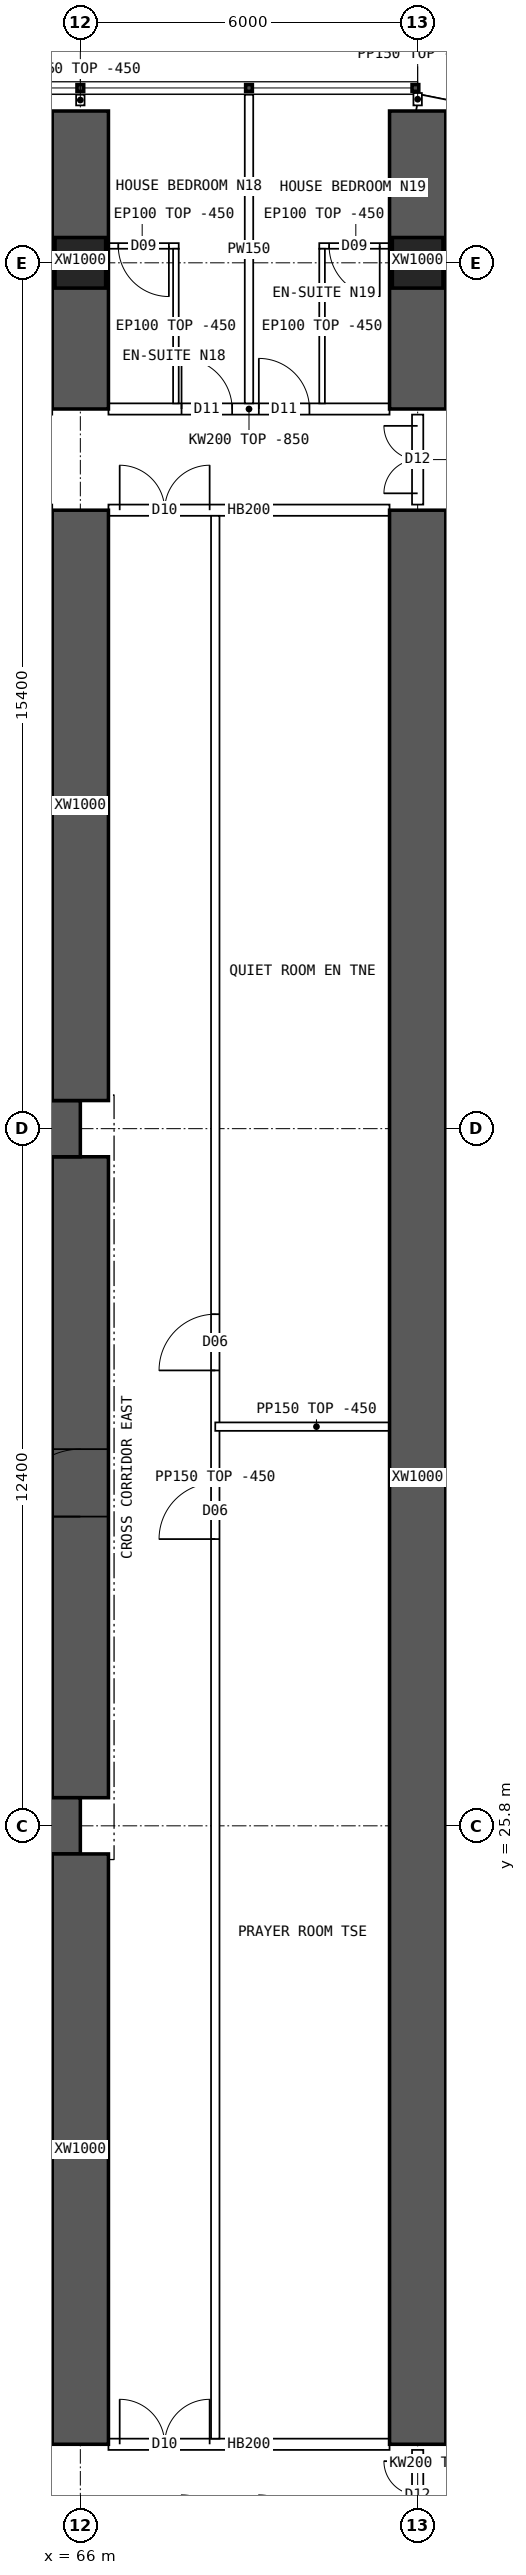
"""IFC4 building model, lengths in metres.
Left out: names, types, materials, properties, quantities, classifications, styles, units other than length and angle.
Written with IfcOpenShell. Run it as: python <this file> out.ifc"""

import sys

from ifc_helpers import new_model, si_unit, direction, frame, frame_2d, origin, origin_2d, place, context, subcontext, project, spatial, polyline, rectangle, hollow_rectangle, outline, extrude, element, fill, save


model = new_model("IFC4")
c1 = context("Model", 3, precision=1e-05, world=origin(), true_north=direction((0.0, 1.0)))
c2 = subcontext(c1, "Body", "Model", "MODEL_VIEW")
j1 = project(units=[si_unit("LENGTHUNIT", "METRE"), si_unit("PLANEANGLEUNIT", "RADIAN")], contexts=[c1])
p1 = place(None, origin())
s1 = spatial("IfcSite", under=j1, at=p1, CompositionType="ELEMENT")
p2 = place(p1, origin())
s2 = spatial("IfcBuilding", under=s1, at=p2, CompositionType="ELEMENT")
p3 = place(p2, frame((0.0, 0.0, 50.2)))
s3 = spatial("IfcBuildingStorey", under=s2, at=p3, CompositionType="ELEMENT", Elevation=50.2)
for number, where, z_axis, x_axis in (
    (1, (66.0, 53.6, 0.0), (0.0, 0.0, 1.0), (1.0, 0.0, 0.0)),
    (2, (72.0, 53.6, 0.0), (0.0, 0.0, 1.0), (1.0, 0.0, 0.0)),
):
    element("IfcColumn", number, at=place(p3, frame(where, z_axis=z_axis, x_axis=x_axis)), inside=s3, PredefinedType="COLUMN", context=c2, shape_type="SweptSolid", body=[
        extrude(hollow_rectangle(XDim=0.9, YDim=0.9, WallThickness=0.09, at=origin_2d()), origin(), (0.0, 0.0, 1.0), 3.75),
    ])
for number, where, z_axis, x_axis in (
    (3, (18.0, 25.8, 0.0), (0.0, 0.0, 1.0), (1.0, 0.0, 0.0)),
    (4, (18.0, 38.2, 0.0), (0.0, 0.0, 1.0), (1.0, 0.0, 0.0)),
):
    element("IfcWall", number, at=place(p3, frame(where, z_axis=z_axis, x_axis=x_axis)), inside=s3, PredefinedType="SHEAR", context=c2, shape_type="SweptSolid", body=[
        extrude(rectangle(XDim=48.0, YDim=1.0, at=frame_2d((24.0, 0.0))), origin(), (0.0, 0.0, 1.0), 3.75),
    ])
p4 = place(p3, frame((66.0, 26.3, 0.0), z_axis=(0.0, 0.0, 1.0), x_axis=(0.0, 1.0, 0.0)))
e5 = element("IfcWall", 5, at=p4, inside=s3, PredefinedType="SHEAR", context=c2, shape_type="SweptSolid", body=[
    extrude(rectangle(XDim=11.4, YDim=1.0, at=frame_2d((5.7, 0.0))), origin(), (0.0, 0.0, 1.0), 3.75),
])
p5 = place(p4, frame((5.0, 0.0, 0.0)))
e6 = element("IfcOpeningElement", 6, at=p5, cuts=e5, PredefinedType="OPENING", context=c2, shape_type="SweptSolid", body=[
    extrude(rectangle(XDim=1.2, YDim=2.1, at=frame_2d((0.6, 1.05))), frame((0.0, 0.51, 0.0), z_axis=(0.0, -1.0, 0.0), x_axis=(1.0, 0.0, 0.0)), (0.0, 0.0, 1.0), 1.02),
])
p6 = place(p3, frame((66.0, 51.0, 0.0), z_axis=(0.0, 0.0, 1.0), x_axis=(0.0, 1.0, 0.0)))
e7 = element("IfcWall", 7, at=p6, inside=s3, PredefinedType="SHEAR", context=c2, shape_type="SweptSolid", body=[
    extrude(rectangle(XDim=5.3, YDim=1.0, at=frame_2d((2.65, 0.0))), origin(), (0.0, 0.0, 1.0), 3.75),
])
for number, where, z_axis, x_axis in (
    (8, (66.0, 14.8, 0.0), (0.0, 0.0, 1.0), (0.0, 1.0, 0.0)),
    (9, (66.0, 38.7, 0.0), (0.0, 0.0, 1.0), (0.0, 1.0, 0.0)),
):
    element("IfcWall", number, at=place(p3, frame(where, z_axis=z_axis, x_axis=x_axis)), inside=s3, PredefinedType="SHEAR", context=c2, shape_type="SweptSolid", body=[
        extrude(rectangle(XDim=10.5, YDim=1.0, at=frame_2d((5.25, 0.0))), origin(), (0.0, 0.0, 1.0), 3.75),
    ])
p7 = place(p3, frame((72.0, 51.0, 0.0), z_axis=(0.0, 0.0, 1.0), x_axis=(0.0, 1.0, 0.0)))
e10 = element("IfcWall", 10, at=p7, inside=s3, PredefinedType="SHEAR", context=c2, shape_type="SweptSolid", body=[
    extrude(rectangle(XDim=5.3, YDim=1.0, at=frame_2d((2.65, 0.0))), origin(), (0.0, 0.0, 1.0), 3.75),
])
p8 = place(p3, frame((72.0, 14.8, 0.0), z_axis=(0.0, 0.0, 1.0), x_axis=(0.0, 1.0, 0.0)))
e11 = element("IfcWall", 11, at=p8, inside=s3, PredefinedType="SHEAR", context=c2, shape_type="SweptSolid", body=[
    extrude(rectangle(XDim=34.4, YDim=1.0, at=frame_2d((17.2, 0.0))), origin(), (0.0, 0.0, 1.0), 3.75),
])
p9 = place(p3, frame((75.157, 55.822, 0.0), z_axis=(0.0, 0.0, 1.0), x_axis=(-0.980787251524, 0.195080412259, 0.0)))
e12 = element("IfcWall", 12, at=p9, inside=s3, PredefinedType="SOLIDWALL", context=c2, shape_type="SweptSolid", body=[
    extrude(outline(polyline([(-0.03, -0.15), (3.249, -0.15), (3.189, 0.15), (0.03, 0.15), (-0.03, -0.15)])), origin(), (0.0, 0.0, 1.0), 3.3),
])
p10 = place(p9, frame((0.909, 0.0, 0.9)))
e13 = element("IfcOpeningElement", 13, at=p10, cuts=e12, PredefinedType="OPENING", context=c2, shape_type="SweptSolid", body=[
    extrude(rectangle(XDim=1.4, YDim=1.8, at=frame_2d((0.7, 0.9))), frame((0.0, 0.16, 0.0), z_axis=(0.0, -1.0, 0.0), x_axis=(1.0, 0.0, 0.0)), (0.0, 0.0, 1.0), 0.32),
])
p11 = place(p3, frame((66.5, 14.8, 0.0), z_axis=(0.0, 0.0, 1.0), x_axis=(1.0, 0.0, 0.0)))
e14 = element("IfcWall", 14, at=p11, inside=s3, PredefinedType="SOLIDWALL", context=c2, shape_type="SweptSolid", body=[
    extrude(rectangle(XDim=5.0, YDim=0.2, at=frame_2d((2.5, 0.0))), origin(), (0.0, 0.0, 1.0), 3.3),
])
p12 = place(p11, frame((0.2, 0.0, 0.0)))
e15 = element("IfcOpeningElement", 15, at=p12, cuts=e14, PredefinedType="OPENING", context=c2, shape_type="SweptSolid", body=[
    extrude(rectangle(XDim=1.6, YDim=2.1, at=frame_2d((0.8, 1.05))), frame((0.0, 0.11, 0.0), z_axis=(0.0, -1.0, 0.0), x_axis=(1.0, 0.0, 0.0)), (0.0, 0.0, 1.0), 0.22),
])
p13 = place(p3, frame((66.5, 51.0, 0.0), z_axis=(0.0, 0.0, 1.0), x_axis=(1.0, 0.0, 0.0)))
e16 = element("IfcWall", 16, at=p13, inside=s3, PredefinedType="SOLIDWALL", context=c2, shape_type="SweptSolid", body=[
    extrude(outline(polyline([(0.0, 0.0), (5.0, 0.0), (5.0, 2.9), (0.0, 2.9), (0.0, 0.0)])), frame((0.0, 0.1, 0.0), z_axis=(0.0, -1.0, 0.0), x_axis=(1.0, 0.0, 0.0)), (0.0, 0.0, 1.0), 0.2),
])
p14 = place(p13, frame((1.3, 0.0, 0.0)))
e17 = element("IfcOpeningElement", 17, at=p14, cuts=e16, PredefinedType="OPENING", context=c2, shape_type="SweptSolid", body=[
    extrude(rectangle(XDim=0.9, YDim=2.1, at=frame_2d((0.45, 1.05))), frame((0.0, 0.11, 0.0), z_axis=(0.0, -1.0, 0.0), x_axis=(1.0, 0.0, 0.0)), (0.0, 0.0, 1.0), 0.22),
])
p15 = place(p13, frame((2.675, 0.0, 0.0)))
e18 = element("IfcOpeningElement", 18, at=p15, cuts=e16, PredefinedType="OPENING", context=c2, shape_type="SweptSolid", body=[
    extrude(rectangle(XDim=0.9, YDim=2.1, at=frame_2d((0.45, 1.05))), frame((0.0, 0.11, 0.0), z_axis=(0.0, -1.0, 0.0), x_axis=(1.0, 0.0, 0.0)), (0.0, 0.0, 1.0), 0.22),
])
p16 = place(p3, frame((66.5, 49.2, 0.0), z_axis=(0.0, 0.0, 1.0), x_axis=(1.0, 0.0, 0.0)))
e19 = element("IfcWall", 19, at=p16, inside=s3, PredefinedType="SOLIDWALL", context=c2, shape_type="SweptSolid", body=[
    extrude(rectangle(XDim=5.0, YDim=0.2, at=frame_2d((2.5, 0.0))), origin(), (0.0, 0.0, 1.0), 3.3),
])
p17 = place(p16, frame((0.2, 0.0, 0.0)))
e20 = element("IfcOpeningElement", 20, at=p17, cuts=e19, PredefinedType="OPENING", context=c2, shape_type="SweptSolid", body=[
    extrude(rectangle(XDim=1.6, YDim=2.1, at=frame_2d((0.8, 1.05))), frame((0.0, 0.11, 0.0), z_axis=(0.0, -1.0, 0.0), x_axis=(1.0, 0.0, 0.0)), (0.0, 0.0, 1.0), 0.22),
])
p18 = place(p3, frame((69.0, 56.59, 0.0), z_axis=(0.0, 0.0, 1.0), x_axis=(0.0, -1.0, 0.0)))
e21 = element("IfcWall", 21, at=p18, inside=s3, PredefinedType="PARTITIONING", context=c2, shape_type="SweptSolid", body=[
    extrude(outline(polyline([(0.0, 0.0), (5.49, 0.0), (5.49, 2.9), (5.442, 2.9), (5.44, 3.3), (3.192, 3.3), (3.19, 2.9), (2.792, 2.9), (2.79, 3.3), (0.0, 3.3), (0.0, 0.0)])), frame((0.0, 0.075, 0.0), z_axis=(0.0, -1.0, 0.0), x_axis=(1.0, 0.0, 0.0)), (0.0, 0.0, 1.0), 0.15),
])
p19 = place(p3, frame((66.45, 53.9, 0.0), z_axis=(0.0, 0.0, 1.0), x_axis=(1.0, 0.0, 0.0)))
e22 = element("IfcWall", 22, at=p19, inside=s3, PredefinedType="PARTITIONING", context=c2, shape_type="SweptSolid", body=[
    extrude(rectangle(XDim=1.3, YDim=0.1, at=frame_2d((0.65, 0.0))), origin(), (0.0, 0.0, 1.0), 3.3),
])
p20 = place(p19, frame((0.225, 0.0, 0.0)))
e23 = element("IfcOpeningElement", 23, at=p20, cuts=e22, PredefinedType="OPENING", context=c2, shape_type="SweptSolid", body=[
    extrude(rectangle(XDim=0.9, YDim=2.1, at=frame_2d((0.45, 1.05))), frame((0.0, 0.06, 0.0), z_axis=(0.0, -1.0, 0.0), x_axis=(1.0, 0.0, 0.0)), (0.0, 0.0, 1.0), 0.12),
])
p21 = place(p3, frame((67.7, 53.85, 0.0), z_axis=(0.0, 0.0, 1.0), x_axis=(0.0, -1.0, 0.0)))
e24 = element("IfcWall", 24, at=p21, inside=s3, PredefinedType="PARTITIONING", context=c2, shape_type="SweptSolid", body=[
    extrude(outline(polyline([(0.0, 0.0), (2.75, 0.0), (2.75, 2.9), (2.702, 2.9), (2.7, 3.3), (0.452, 3.3), (0.45, 2.9), (0.0, 2.9), (0.0, 0.0)])), frame((0.0, 0.05, 0.0), z_axis=(0.0, -1.0, 0.0), x_axis=(1.0, 0.0, 0.0)), (0.0, 0.0, 1.0), 0.1),
])
p22 = place(p3, frame((70.25, 53.9, 0.0), z_axis=(0.0, 0.0, 1.0), x_axis=(1.0, 0.0, 0.0)))
e25 = element("IfcWall", 25, at=p22, inside=s3, PredefinedType="PARTITIONING", context=c2, shape_type="SweptSolid", body=[
    extrude(rectangle(XDim=1.3, YDim=0.1, at=frame_2d((0.65, 0.0))), origin(), (0.0, 0.0, 1.0), 3.3),
])
p23 = place(p22, frame((0.175, 0.0, 0.0)))
e26 = element("IfcOpeningElement", 26, at=p23, cuts=e25, PredefinedType="OPENING", context=c2, shape_type="SweptSolid", body=[
    extrude(rectangle(XDim=0.9, YDim=2.1, at=frame_2d((0.45, 1.05))), frame((0.0, 0.06, 0.0), z_axis=(0.0, -1.0, 0.0), x_axis=(1.0, 0.0, 0.0)), (0.0, 0.0, 1.0), 0.12),
])
p24 = place(p3, frame((70.3, 53.85, 0.0), z_axis=(0.0, 0.0, 1.0), x_axis=(0.0, -1.0, 0.0)))
e27 = element("IfcWall", 27, at=p24, inside=s3, PredefinedType="PARTITIONING", context=c2, shape_type="SweptSolid", body=[
    extrude(outline(polyline([(0.0, 0.0), (2.75, 0.0), (2.75, 2.9), (2.702, 2.9), (2.7, 3.3), (0.452, 3.3), (0.45, 2.9), (0.0, 2.9), (0.0, 0.0)])), frame((0.0, 0.05, 0.0), z_axis=(0.0, -1.0, 0.0), x_axis=(1.0, 0.0, 0.0)), (0.0, 0.0, 1.0), 0.1),
])
p25 = place(p3, frame((68.4, 14.9, 0.0), z_axis=(0.0, 0.0, 1.0), x_axis=(0.0, 1.0, 0.0)))
e28 = element("IfcWall", 28, at=p25, inside=s3, PredefinedType="PARTITIONING", context=c2, shape_type="SweptSolid", body=[
    extrude(rectangle(XDim=34.2, YDim=0.15, at=frame_2d((17.1, 0.0))), origin(), (0.0, 0.0, 1.0), 3.3),
])
p26 = place(p25, frame((16.0, 0.0, 0.0)))
e29 = element("IfcOpeningElement", 29, at=p26, cuts=e28, PredefinedType="OPENING", context=c2, shape_type="SweptSolid", body=[
    extrude(rectangle(XDim=1.0, YDim=2.1, at=frame_2d((0.5, 1.05))), frame((0.0, 0.085, 0.0), z_axis=(0.0, -1.0, 0.0), x_axis=(1.0, 0.0, 0.0)), (0.0, 0.0, 1.0), 0.17),
])
p27 = place(p25, frame((19.0, 0.0, 0.0)))
e30 = element("IfcOpeningElement", 30, at=p27, cuts=e28, PredefinedType="OPENING", context=c2, shape_type="SweptSolid", body=[
    extrude(rectangle(XDim=1.0, YDim=2.1, at=frame_2d((0.5, 1.05))), frame((0.0, 0.085, 0.0), z_axis=(0.0, -1.0, 0.0), x_axis=(1.0, 0.0, 0.0)), (0.0, 0.0, 1.0), 0.17),
])
p28 = place(p3, frame((68.4, 32.9, 0.0), z_axis=(0.0, 0.0, 1.0), x_axis=(1.0, 0.0, 0.0)))
e31 = element("IfcWall", 31, at=p28, inside=s3, PredefinedType="PARTITIONING", context=c2, shape_type="SweptSolid", body=[
    extrude(rectangle(XDim=3.6, YDim=0.15, at=frame_2d((1.8, 0.0))), origin(), (0.0, 0.0, 1.0), 3.3),
])
p29 = place(p3, frame((72.075, 30.85, 0.0), z_axis=(0.0, 0.0, 1.0), x_axis=(1.0, 0.0, 0.0)))
e32 = element("IfcWall", 32, at=p29, inside=s3, PredefinedType="PARTITIONING", context=c2, shape_type="SweptSolid", body=[
    extrude(outline(polyline([(0.0, 0.0), (8.02, 0.0), (8.02, 3.3), (6.227, 3.3), (6.225, 2.85), (5.627, 2.85), (5.625, 3.3), (0.0, 3.3), (0.0, 0.0)])), frame((0.0, 0.075, 0.0), z_axis=(0.0, -1.0, 0.0), x_axis=(1.0, 0.0, 0.0)), (0.0, 0.0, 1.0), 0.15),
])
p30 = place(p3, frame((72.0, 13.1, 0.0), z_axis=(0.0, 0.0, 1.0), x_axis=(0.0, 1.0, 0.0)))
e33 = element("IfcWall", 33, at=p30, inside=s3, PredefinedType="SOLIDWALL", context=c2, shape_type="SweptSolid", body=[
    extrude(outline(polyline([(0.0, 0.0), (1.6, 0.0), (1.6, 2.85), (0.0, 2.85), (0.0, 0.0)])), frame((0.0, 0.1, 0.0), z_axis=(0.0, -1.0, 0.0), x_axis=(1.0, 0.0, 0.0)), (0.0, 0.0, 1.0), 0.2),
])
p31 = place(p30, frame((0.2, 0.0, 0.0)))
e34 = element("IfcOpeningElement", 34, at=p31, cuts=e33, PredefinedType="OPENING", context=c2, shape_type="SweptSolid", body=[
    extrude(rectangle(XDim=1.2, YDim=2.1, at=frame_2d((0.6, 1.05))), frame((0.0, 0.11, 0.0), z_axis=(0.0, -1.0, 0.0), x_axis=(1.0, 0.0, 0.0)), (0.0, 0.0, 1.0), 0.22),
])
p32 = place(p3, frame((72.0, 49.3, 0.0), z_axis=(0.0, 0.0, 1.0), x_axis=(0.0, 1.0, 0.0)))
e35 = element("IfcWall", 35, at=p32, inside=s3, PredefinedType="SOLIDWALL", context=c2, shape_type="SweptSolid", body=[
    extrude(outline(polyline([(0.0, 0.0), (1.6, 0.0), (1.6, 2.85), (0.0, 2.85), (0.0, 0.0)])), frame((0.0, 0.1, 0.0), z_axis=(0.0, -1.0, 0.0), x_axis=(1.0, 0.0, 0.0)), (0.0, 0.0, 1.0), 0.2),
])
p33 = place(p32, frame((0.2, 0.0, 0.0)))
e36 = element("IfcOpeningElement", 36, at=p33, cuts=e35, PredefinedType="OPENING", context=c2, shape_type="SweptSolid", body=[
    extrude(rectangle(XDim=1.2, YDim=2.1, at=frame_2d((0.6, 1.05))), frame((0.0, 0.11, 0.0), z_axis=(0.0, -1.0, 0.0), x_axis=(1.0, 0.0, 0.0)), (0.0, 0.0, 1.0), 0.22),
])
p34 = place(p3, frame((66.0, 56.4, 0.0), z_axis=(0.0, 0.0, 1.0), x_axis=(0.0, 1.0, 0.0)))
e37 = element("IfcWall", 37, at=p34, inside=s3, PredefinedType="PARTITIONING", context=c2, shape_type="SweptSolid", body=[
    extrude(rectangle(XDim=0.19, YDim=0.15, at=frame_2d((0.095, 0.0))), origin(), (0.0, 0.0, 1.0), 3.3),
])
p35 = place(p3, frame((72.0, 56.4, 0.0), z_axis=(0.0, 0.0, 1.0), x_axis=(0.0, 1.0, 0.0)))
e38 = element("IfcWall", 38, at=p35, inside=s3, PredefinedType="PARTITIONING", context=c2, shape_type="SweptSolid", body=[
    extrude(rectangle(XDim=0.22, YDim=0.15, at=frame_2d((0.11, 0.0))), origin(), (0.0, 0.0, 1.0), 3.3),
])
p36 = place(p5, origin())
e39 = element("IfcDoor", 39, at=p36, inside=s3, OperationType="SINGLE_SWING_LEFT", PredefinedType="DOOR", context=c2, shape_type="SweptSolid", body=[
    extrude(rectangle(XDim=1.2, YDim=2.1, at=frame_2d((0.6, 1.05))), frame((0.0, 0.025, 0.0), z_axis=(0.0, -1.0, 0.0), x_axis=(1.0, 0.0, 0.0)), (0.0, 0.0, 1.0), 0.05),
])
fill(e6, e39)
p37 = place(p12, origin())
e40 = element("IfcDoor", 40, at=p37, inside=s3, OperationType="DOUBLE_DOOR_SINGLE_SWING", PredefinedType="DOOR", context=c2, shape_type="SweptSolid", body=[
    extrude(rectangle(XDim=1.6, YDim=2.1, at=frame_2d((0.8, 1.05))), frame((0.0, 0.025, 0.0), z_axis=(0.0, -1.0, 0.0), x_axis=(1.0, 0.0, 0.0)), (0.0, 0.0, 1.0), 0.05),
])
fill(e15, e40)
p38 = place(p17, origin())
e41 = element("IfcDoor", 41, at=p38, inside=s3, OperationType="DOUBLE_DOOR_SINGLE_SWING", PredefinedType="DOOR", context=c2, shape_type="SweptSolid", body=[
    extrude(rectangle(XDim=1.6, YDim=2.1, at=frame_2d((0.8, 1.05))), frame((0.0, 0.025, 0.0), z_axis=(0.0, -1.0, 0.0), x_axis=(1.0, 0.0, 0.0)), (0.0, 0.0, 1.0), 0.05),
])
fill(e20, e41)
p39 = place(p20, origin())
e42 = element("IfcDoor", 42, at=p39, inside=s3, OperationType="SINGLE_SWING_RIGHT", PredefinedType="DOOR", context=c2, shape_type="SweptSolid", body=[
    extrude(rectangle(XDim=0.9, YDim=2.1, at=frame_2d((0.45, 1.05))), frame((0.0, 0.025, 0.0), z_axis=(0.0, -1.0, 0.0), x_axis=(1.0, 0.0, 0.0)), (0.0, 0.0, 1.0), 0.05),
])
fill(e23, e42)
p40 = place(p14, origin())
e43 = element("IfcDoor", 43, at=p40, inside=s3, OperationType="SINGLE_SWING_LEFT", PredefinedType="DOOR", context=c2, shape_type="SweptSolid", body=[
    extrude(rectangle(XDim=0.9, YDim=2.1, at=frame_2d((0.45, 1.05))), frame((0.0, 0.025, 0.0), z_axis=(0.0, -1.0, 0.0), x_axis=(1.0, 0.0, 0.0)), (0.0, 0.0, 1.0), 0.05),
])
fill(e17, e43)
p41 = place(p23, origin())
e44 = element("IfcDoor", 44, at=p41, inside=s3, OperationType="SINGLE_SWING_RIGHT", PredefinedType="DOOR", context=c2, shape_type="SweptSolid", body=[
    extrude(rectangle(XDim=0.9, YDim=2.1, at=frame_2d((0.45, 1.05))), frame((0.0, 0.025, 0.0), z_axis=(0.0, -1.0, 0.0), x_axis=(1.0, 0.0, 0.0)), (0.0, 0.0, 1.0), 0.05),
])
fill(e26, e44)
p42 = place(p15, origin())
e45 = element("IfcDoor", 45, at=p42, inside=s3, OperationType="SINGLE_SWING_LEFT", PredefinedType="DOOR", context=c2, shape_type="SweptSolid", body=[
    extrude(rectangle(XDim=0.9, YDim=2.1, at=frame_2d((0.45, 1.05))), frame((0.0, 0.025, 0.0), z_axis=(0.0, -1.0, 0.0), x_axis=(1.0, 0.0, 0.0)), (0.0, 0.0, 1.0), 0.05),
])
fill(e18, e45)
p43 = place(p26, origin())
e46 = element("IfcDoor", 46, at=p43, inside=s3, OperationType="SINGLE_SWING_LEFT", PredefinedType="DOOR", context=c2, shape_type="SweptSolid", body=[
    extrude(rectangle(XDim=1.0, YDim=2.1, at=frame_2d((0.5, 1.05))), frame((0.0, 0.025, 0.0), z_axis=(0.0, -1.0, 0.0), x_axis=(1.0, 0.0, 0.0)), (0.0, 0.0, 1.0), 0.05),
])
fill(e29, e46)
p44 = place(p27, origin())
e47 = element("IfcDoor", 47, at=p44, inside=s3, OperationType="SINGLE_SWING_LEFT", PredefinedType="DOOR", context=c2, shape_type="SweptSolid", body=[
    extrude(rectangle(XDim=1.0, YDim=2.1, at=frame_2d((0.5, 1.05))), frame((0.0, 0.025, 0.0), z_axis=(0.0, -1.0, 0.0), x_axis=(1.0, 0.0, 0.0)), (0.0, 0.0, 1.0), 0.05),
])
fill(e30, e47)
p45 = place(p31, origin())
e48 = element("IfcDoor", 48, at=p45, inside=s3, OperationType="DOUBLE_DOOR_SINGLE_SWING", PredefinedType="DOOR", context=c2, shape_type="SweptSolid", body=[
    extrude(rectangle(XDim=1.2, YDim=2.1, at=frame_2d((0.6, 1.05))), frame((0.0, 0.025, 0.0), z_axis=(0.0, -1.0, 0.0), x_axis=(1.0, 0.0, 0.0)), (0.0, 0.0, 1.0), 0.05),
])
fill(e34, e48)
p46 = place(p33, origin())
e49 = element("IfcDoor", 49, at=p46, inside=s3, OperationType="DOUBLE_DOOR_SINGLE_SWING", PredefinedType="DOOR", context=c2, shape_type="SweptSolid", body=[
    extrude(rectangle(XDim=1.2, YDim=2.1, at=frame_2d((0.6, 1.05))), frame((0.0, 0.025, 0.0), z_axis=(0.0, -1.0, 0.0), x_axis=(1.0, 0.0, 0.0)), (0.0, 0.0, 1.0), 0.05),
])
fill(e36, e49)
save(model, sys.argv[1])
